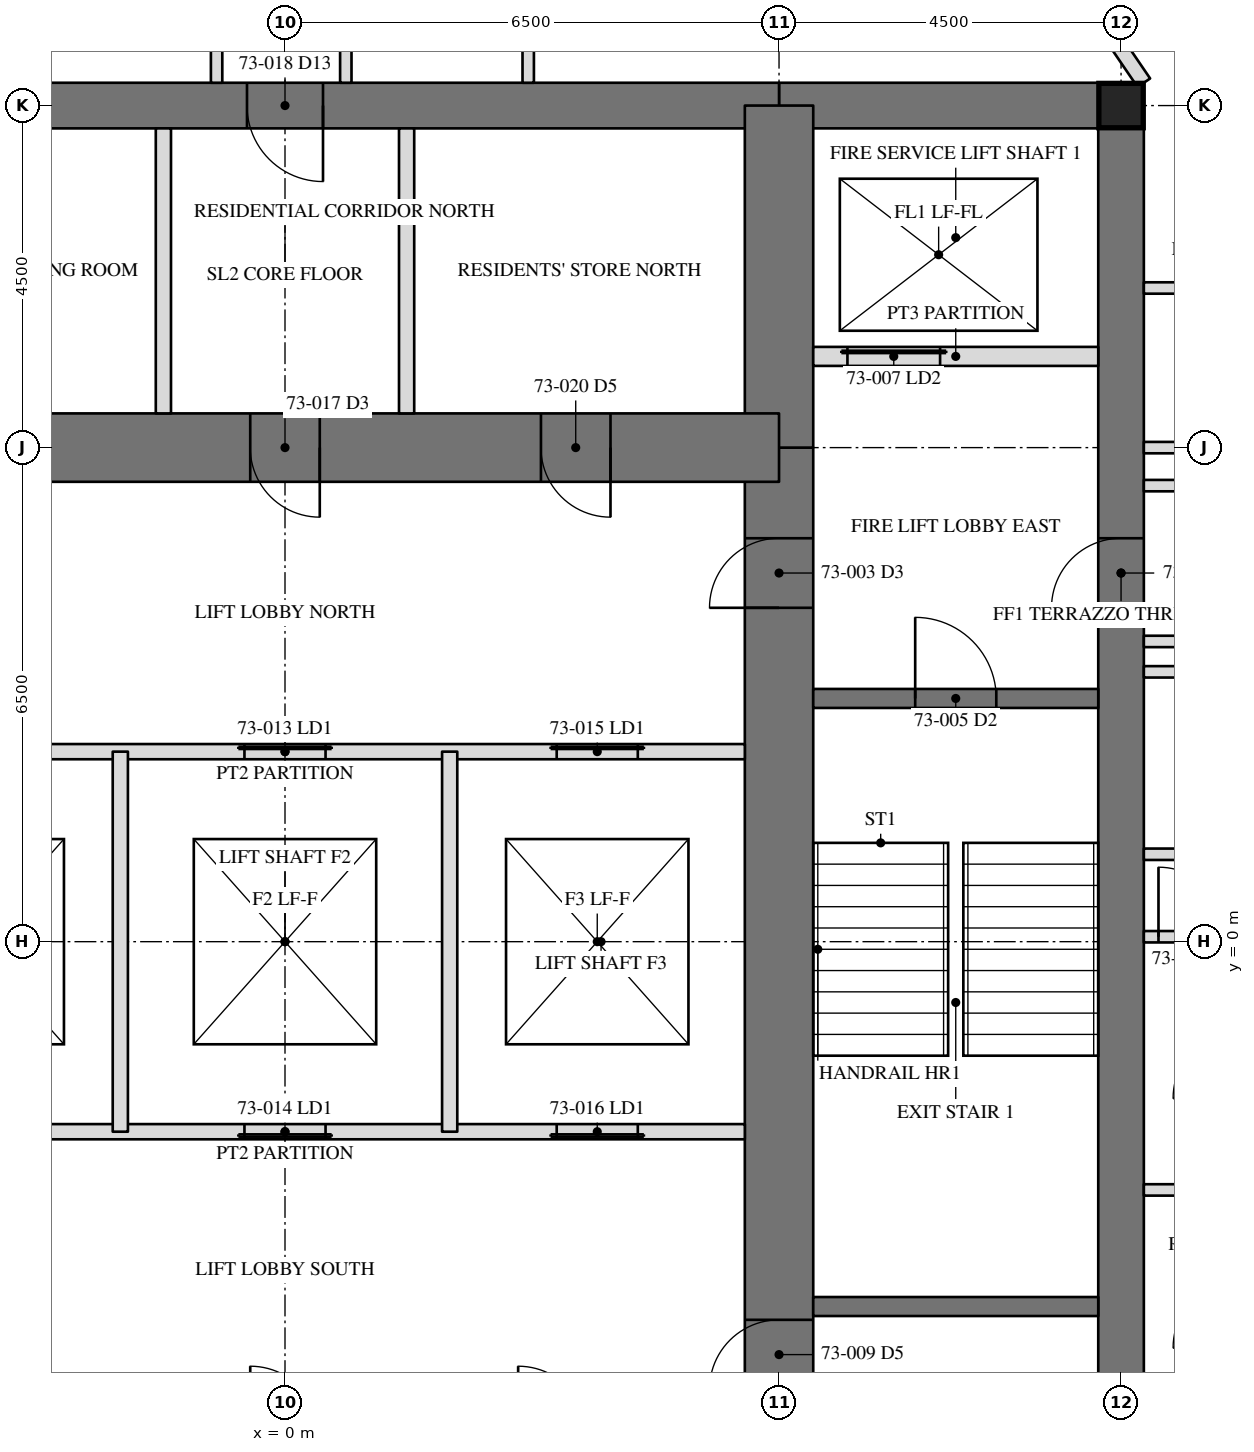
"""IFC4 building model, lengths in metres.
Left out: names, types, materials, properties, quantities, classifications, styles, units other than length and angle.
Written with IfcOpenShell. Run it as: python <this file> out.ifc"""

import sys

from ifc_helpers import new_model, si_unit, direction, frame, frame_2d, origin, origin_2d, place, context, subcontext, project, spatial, rectangle, hollow_rectangle, extrude, element, fill, save


model = new_model("IFC4")
c1 = context("Model", 3, precision=1e-05, world=origin(), true_north=direction((0.0, 1.0)))
c2 = subcontext(c1, "Body", "Model", "MODEL_VIEW")
j1 = project(units=[si_unit("LENGTHUNIT", "METRE"), si_unit("PLANEANGLEUNIT", "RADIAN")], contexts=[c1])
p1 = place(None, origin())
s1 = spatial("IfcSite", under=j1, at=p1, CompositionType="ELEMENT")
p2 = place(p1, origin())
s2 = spatial("IfcBuilding", under=s1, at=p2, CompositionType="ELEMENT")
p3 = place(p2, frame((0.0, 0.0, 295.6)))
s3 = spatial("IfcBuildingStorey", under=s2, at=p3, CompositionType="ELEMENT", Elevation=295.6)
p4 = place(p3, frame((11.0, -11.0, 0.0), z_axis=(0.0, 0.0, 1.0), x_axis=(0.0, 1.0, 0.0)))
e1 = element("IfcWall", 1, at=p4, inside=s3, PredefinedType="SHEAR", context=c2, shape_type="SweptSolid", body=[
    extrude(rectangle(XDim=22.0, YDim=0.6, at=frame_2d((11.0, 0.0))), origin(), (0.0, 0.0, 1.0), 3.6),
])
p5 = place(p4, frame((15.393, 0.0, 0.0)))
e2 = element("IfcOpeningElement", 2, at=p5, cuts=e1, PredefinedType="OPENING", context=c2, shape_type="SweptSolid", body=[
    extrude(rectangle(XDim=0.915, YDim=2.134, at=frame_2d((0.458, 1.067))), frame((0.0, 0.31, 0.0), z_axis=(0.0, -1.0, 0.0), x_axis=(1.0, 0.0, 0.0)), (0.0, 0.0, 1.0), 0.62),
])
p6 = place(p3, frame((11.0, 11.0, 0.0), z_axis=(0.0, 0.0, 1.0), x_axis=(-1.0, 0.0, 0.0)))
e3 = element("IfcWall", 3, at=p6, inside=s3, PredefinedType="SHEAR", context=c2, shape_type="SweptSolid", body=[
    extrude(rectangle(XDim=4.5, YDim=0.6, at=frame_2d((2.25, 0.0))), origin(), (0.0, 0.0, 1.0), 3.6),
])
p7 = place(p3, frame((6.5, 11.0, 0.0), z_axis=(0.0, 0.0, 1.0), x_axis=(-1.0, 0.0, 0.0)))
e4 = element("IfcWall", 4, at=p7, inside=s3, PredefinedType="SHEAR", context=c2, shape_type="SweptSolid", body=[
    extrude(rectangle(XDim=13.0, YDim=0.6, at=frame_2d((6.5, 0.0))), origin(), (0.0, 0.0, 1.0), 3.6),
])
p8 = place(p7, frame((6.0, 0.0, 0.0)))
e5 = element("IfcOpeningElement", 5, at=p8, cuts=e4, PredefinedType="OPENING", context=c2, shape_type="SweptSolid", body=[
    extrude(rectangle(XDim=1.0, YDim=2.134, at=frame_2d((0.5, 1.067))), frame((0.0, 0.31, 0.0), z_axis=(0.0, -1.0, 0.0), x_axis=(1.0, 0.0, 0.0)), (0.0, 0.0, 1.0), 0.62),
])
p9 = place(p3, frame((6.5, -6.5, 0.0), z_axis=(0.0, 0.0, 1.0), x_axis=(0.0, 1.0, 0.0)))
e6 = element("IfcWall", 6, at=p9, inside=s3, PredefinedType="SHEAR", context=c2, shape_type="SweptSolid", body=[
    extrude(rectangle(XDim=13.0, YDim=0.9, at=frame_2d((6.5, 0.0))), origin(), (0.0, 0.0, 1.0), 3.6),
])
p10 = place(p9, frame((10.893, 0.0, 0.0)))
e7 = element("IfcOpeningElement", 7, at=p10, cuts=e6, PredefinedType="OPENING", context=c2, shape_type="SweptSolid", body=[
    extrude(rectangle(XDim=0.915, YDim=2.134, at=frame_2d((0.458, 1.067))), frame((0.0, 0.46, 0.0), z_axis=(0.0, -1.0, 0.0), x_axis=(1.0, 0.0, 0.0)), (0.0, 0.0, 1.0), 0.92),
])
p11 = place(p9, frame((0.61, 0.0, 0.0)))
e8 = element("IfcOpeningElement", 8, at=p11, cuts=e6, PredefinedType="OPENING", context=c2, shape_type="SweptSolid", body=[
    extrude(rectangle(XDim=0.915, YDim=2.134, at=frame_2d((0.458, 1.067))), frame((0.0, 0.46, 0.0), z_axis=(0.0, -1.0, 0.0), x_axis=(1.0, 0.0, 0.0)), (0.0, 0.0, 1.0), 0.92),
])
p12 = place(p3, frame((6.5, 6.5, 0.0), z_axis=(0.0, 0.0, 1.0), x_axis=(0.0, 1.0, 0.0)))
e9 = element("IfcWall", 9, at=p12, inside=s3, PredefinedType="SHEAR", context=c2, shape_type="SweptSolid", body=[
    extrude(rectangle(XDim=4.5, YDim=0.9, at=frame_2d((2.25, 0.0))), origin(), (0.0, 0.0, 1.0), 3.6),
])
p13 = place(p3, frame((6.5, 6.5, 0.0), z_axis=(0.0, 0.0, 1.0), x_axis=(-1.0, 0.0, 0.0)))
e10 = element("IfcWall", 10, at=p13, inside=s3, PredefinedType="SHEAR", context=c2, shape_type="SweptSolid", body=[
    extrude(rectangle(XDim=13.0, YDim=0.9, at=frame_2d((6.5, 0.0))), origin(), (0.0, 0.0, 1.0), 3.6),
])
p14 = place(p13, frame((6.042, 0.0, 0.0)))
e11 = element("IfcOpeningElement", 11, at=p14, cuts=e10, PredefinedType="OPENING", context=c2, shape_type="SweptSolid", body=[
    extrude(rectangle(XDim=0.915, YDim=2.134, at=frame_2d((0.458, 1.067))), frame((0.0, 0.46, 0.0), z_axis=(0.0, -1.0, 0.0), x_axis=(1.0, 0.0, 0.0)), (0.0, 0.0, 1.0), 0.92),
])
p15 = place(p13, frame((9.766, 0.0, 0.0)))
e12 = element("IfcOpeningElement", 12, at=p15, cuts=e10, PredefinedType="OPENING", context=c2, shape_type="SweptSolid", body=[
    extrude(rectangle(XDim=1.118, YDim=2.134, at=frame_2d((0.559, 1.067))), frame((0.0, 0.46, 0.0), z_axis=(0.0, -1.0, 0.0), x_axis=(1.0, 0.0, 0.0)), (0.0, 0.0, 1.0), 0.92),
])
p16 = place(p13, frame((2.218, 0.0, 0.0)))
e13 = element("IfcOpeningElement", 13, at=p16, cuts=e10, PredefinedType="OPENING", context=c2, shape_type="SweptSolid", body=[
    extrude(rectangle(XDim=0.915, YDim=2.134, at=frame_2d((0.458, 1.067))), frame((0.0, 0.46, 0.0), z_axis=(0.0, -1.0, 0.0), x_axis=(1.0, 0.0, 0.0)), (0.0, 0.0, 1.0), 0.92),
])
p17 = place(p3, frame((11.0, 11.0, 0.0), z_axis=(0.0, 0.0, 1.0), x_axis=(1.0, 0.0, 0.0)))
e14 = element("IfcColumn", 14, at=p17, inside=s3, PredefinedType="COLUMN", context=c2, shape_type="SweptSolid", body=[
    extrude(hollow_rectangle(XDim=0.584, YDim=0.584, WallThickness=0.051, at=origin_2d()), origin(), (0.0, 0.0, 1.0), 3.6),
])
p18 = place(p3, frame((6.95, -4.8, 0.0), z_axis=(0.0, 0.0, 1.0), x_axis=(1.0, 0.0, 0.0)))
e15 = element("IfcWall", 15, at=p18, inside=s3, PredefinedType="SOLIDWALL", context=c2, shape_type="SweptSolid", body=[
    extrude(rectangle(XDim=3.75, YDim=0.25, at=frame_2d((1.875, 0.0))), origin(), (0.0, 0.0, 1.0), 3.41),
])
p19 = place(p3, frame((6.95, 3.2, 0.0), z_axis=(0.0, 0.0, 1.0), x_axis=(1.0, 0.0, 0.0)))
e16 = element("IfcWall", 16, at=p19, inside=s3, PredefinedType="SOLIDWALL", context=c2, shape_type="SweptSolid", body=[
    extrude(rectangle(XDim=3.75, YDim=0.25, at=frame_2d((1.875, 0.0))), origin(), (0.0, 0.0, 1.0), 3.41),
])
p20 = place(p19, frame((1.342, 0.0, 0.0)))
e17 = element("IfcOpeningElement", 17, at=p20, cuts=e16, PredefinedType="OPENING", context=c2, shape_type="SweptSolid", body=[
    extrude(rectangle(XDim=1.067, YDim=2.134, at=frame_2d((0.533, 1.067))), frame((0.0, 0.135, 0.0), z_axis=(0.0, -1.0, 0.0), x_axis=(1.0, 0.0, 0.0)), (0.0, 0.0, 1.0), 0.27),
])
p21 = place(p3, frame((6.95, 7.7, 0.0), z_axis=(0.0, 0.0, 1.0), x_axis=(1.0, 0.0, 0.0)))
e18 = element("IfcWall", 18, at=p21, inside=s3, PredefinedType="PARTITIONING", context=c2, shape_type="SweptSolid", body=[
    extrude(rectangle(XDim=3.75, YDim=0.25, at=frame_2d((1.875, 0.0))), origin(), (0.0, 0.0, 1.0), 3.41),
])
p22 = place(p21, frame((0.45, 0.0, 0.0)))
e19 = element("IfcOpeningElement", 19, at=p22, cuts=e18, PredefinedType="OPENING", context=c2, shape_type="SweptSolid", body=[
    extrude(rectangle(XDim=1.219, YDim=2.134, at=frame_2d((0.609, 1.067))), frame((0.0, 0.135, 0.0), z_axis=(0.0, -1.0, 0.0), x_axis=(1.0, 0.0, 0.0)), (0.0, 0.0, 1.0), 0.27),
])
p23 = place(p3, frame((-6.05, 2.5, 0.0), z_axis=(0.0, 0.0, 1.0), x_axis=(1.0, 0.0, 0.0)))
e20 = element("IfcWall", 20, at=p23, inside=s3, PredefinedType="PARTITIONING", context=c2, shape_type="SweptSolid", body=[
    extrude(rectangle(XDim=12.1, YDim=0.2, at=frame_2d((6.05, 0.0))), origin(), (0.0, 0.0, 1.0), 3.41),
])
p24 = place(p23, frame((1.408, 0.0, 0.0)))
e21 = element("IfcOpeningElement", 21, at=p24, cuts=e20, PredefinedType="OPENING", context=c2, shape_type="SweptSolid", body=[
    extrude(rectangle(XDim=1.067, YDim=2.134, at=frame_2d((0.533, 1.067))), frame((0.0, 0.11, 0.0), z_axis=(0.0, -1.0, 0.0), x_axis=(1.0, 0.0, 0.0)), (0.0, 0.0, 1.0), 0.22),
])
p25 = place(p23, frame((5.517, 0.0, 0.0)))
e22 = element("IfcOpeningElement", 22, at=p25, cuts=e20, PredefinedType="OPENING", context=c2, shape_type="SweptSolid", body=[
    extrude(rectangle(XDim=1.067, YDim=2.134, at=frame_2d((0.533, 1.067))), frame((0.0, 0.11, 0.0), z_axis=(0.0, -1.0, 0.0), x_axis=(1.0, 0.0, 0.0)), (0.0, 0.0, 1.0), 0.22),
])
p26 = place(p23, frame((9.625, 0.0, 0.0)))
e23 = element("IfcOpeningElement", 23, at=p26, cuts=e20, PredefinedType="OPENING", context=c2, shape_type="SweptSolid", body=[
    extrude(rectangle(XDim=1.067, YDim=2.134, at=frame_2d((0.533, 1.067))), frame((0.0, 0.11, 0.0), z_axis=(0.0, -1.0, 0.0), x_axis=(1.0, 0.0, 0.0)), (0.0, 0.0, 1.0), 0.22),
])
p27 = place(p3, frame((6.05, -2.5, 0.0), z_axis=(0.0, 0.0, 1.0), x_axis=(-1.0, 0.0, 0.0)))
e24 = element("IfcWall", 24, at=p27, inside=s3, PredefinedType="PARTITIONING", context=c2, shape_type="SweptSolid", body=[
    extrude(rectangle(XDim=12.1, YDim=0.2, at=frame_2d((6.05, 0.0))), origin(), (0.0, 0.0, 1.0), 3.41),
])
p28 = place(p27, frame((9.625, 0.0, 0.0)))
e25 = element("IfcOpeningElement", 25, at=p28, cuts=e24, PredefinedType="OPENING", context=c2, shape_type="SweptSolid", body=[
    extrude(rectangle(XDim=1.067, YDim=2.134, at=frame_2d((0.533, 1.067))), frame((0.0, 0.11, 0.0), z_axis=(0.0, -1.0, 0.0), x_axis=(1.0, 0.0, 0.0)), (0.0, 0.0, 1.0), 0.22),
])
p29 = place(p27, frame((5.517, 0.0, 0.0)))
e26 = element("IfcOpeningElement", 26, at=p29, cuts=e24, PredefinedType="OPENING", context=c2, shape_type="SweptSolid", body=[
    extrude(rectangle(XDim=1.067, YDim=2.134, at=frame_2d((0.533, 1.067))), frame((0.0, 0.11, 0.0), z_axis=(0.0, -1.0, 0.0), x_axis=(1.0, 0.0, 0.0)), (0.0, 0.0, 1.0), 0.22),
])
p30 = place(p27, frame((1.408, 0.0, 0.0)))
e27 = element("IfcOpeningElement", 27, at=p30, cuts=e24, PredefinedType="OPENING", context=c2, shape_type="SweptSolid", body=[
    extrude(rectangle(XDim=1.067, YDim=2.134, at=frame_2d((0.533, 1.067))), frame((0.0, 0.11, 0.0), z_axis=(0.0, -1.0, 0.0), x_axis=(1.0, 0.0, 0.0)), (0.0, 0.0, 1.0), 0.22),
])
for number, where, z_axis, x_axis in (
    (28, (-2.167, -2.5, 0.0), (0.0, 0.0, 1.0), (0.0, 1.0, 0.0)),
    (29, (2.167, -2.5, 0.0), (0.0, 0.0, 1.0), (0.0, 1.0, 0.0)),
):
    element("IfcWall", number, at=place(p3, frame(where, z_axis=z_axis, x_axis=x_axis)), inside=s3, PredefinedType="PARTITIONING", context=c2, shape_type="SweptSolid", body=[
        extrude(rectangle(XDim=5.0, YDim=0.2, at=frame_2d((2.5, 0.0))), origin(), (0.0, 0.0, 1.0), 3.41),
    ])
for number, where, z_axis, x_axis in (
    (30, (-1.6, 6.95, 0.0), (0.0, 0.0, 1.0), (0.0, 1.0, 0.0)),
    (31, (1.6, 6.95, 0.0), (0.0, 0.0, 1.0), (0.0, 1.0, 0.0)),
):
    element("IfcWall", number, at=place(p3, frame(where, z_axis=z_axis, x_axis=x_axis)), inside=s3, PredefinedType="PARTITIONING", context=c2, shape_type="SweptSolid", body=[
        extrude(rectangle(XDim=3.75, YDim=0.2, at=frame_2d((1.875, 0.0))), origin(), (0.0, 0.0, 1.0), 3.41),
    ])
p31 = place(p3, frame((11.3, 11.3, 0.0), z_axis=(0.0, 0.0, 1.0), x_axis=(-0.563469639691, 0.826136771453, 0.0)))
e32 = element("IfcWall", 32, at=p31, inside=s3, PredefinedType="PARTITIONING", context=c2, shape_type="SweptSolid", body=[
    extrude(rectangle(XDim=3.137, YDim=0.2, at=frame_2d((1.568, 0.0))), origin(), (0.0, 0.0, 1.0), 2.704),
])
p32 = place(p3, frame((11.3, -3.266, 0.0), z_axis=(0.0, 0.0, 1.0), x_axis=(1.0, 0.0, 0.0)))
e33 = element("IfcWall", 33, at=p32, inside=s3, PredefinedType="PARTITIONING", context=c2, shape_type="SweptSolid", body=[
    extrude(rectangle(XDim=5.615, YDim=0.15, at=frame_2d((2.808, 0.0))), origin(), (0.0, 0.0, 1.0), 2.709),
])
p33 = place(p3, frame((11.3, 0.065, 0.0), z_axis=(0.0, 0.0, 1.0), x_axis=(1.0, 0.0, 0.0)))
e34 = element("IfcWall", 34, at=p33, inside=s3, PredefinedType="PARTITIONING", context=c2, shape_type="SweptSolid", body=[
    extrude(rectangle(XDim=5.615, YDim=0.15, at=frame_2d((2.808, 0.0))), origin(), (0.0, 0.0, 1.0), 2.709),
])
p34 = place(p33, frame((0.192, 0.0, 0.0)))
e35 = element("IfcOpeningElement", 35, at=p34, cuts=e34, PredefinedType="OPENING", context=c2, shape_type="SweptSolid", body=[
    extrude(rectangle(XDim=0.915, YDim=2.134, at=frame_2d((0.458, 1.067))), frame((0.0, 0.085, 0.0), z_axis=(0.0, -1.0, 0.0), x_axis=(1.0, 0.0, 0.0)), (0.0, 0.0, 1.0), 0.17),
])
p35 = place(p3, frame((11.3, 6.5, 0.0), z_axis=(0.0, 0.0, 1.0), x_axis=(1.0, 0.0, 0.0)))
e36 = element("IfcWall", 36, at=p35, inside=s3, PredefinedType="PARTITIONING", context=c2, shape_type="SweptSolid", body=[
    extrude(rectangle(XDim=5.615, YDim=0.15, at=frame_2d((2.808, 0.0))), origin(), (0.0, 0.0, 1.0), 2.966),
])
p36 = place(p35, frame((2.742, 0.0, 0.0)))
e37 = element("IfcOpeningElement", 37, at=p36, cuts=e36, PredefinedType="OPENING", context=c2, shape_type="SweptSolid", body=[
    extrude(rectangle(XDim=0.915, YDim=2.134, at=frame_2d((0.458, 1.067))), frame((0.0, 0.085, 0.0), z_axis=(0.0, -1.0, 0.0), x_axis=(1.0, 0.0, 0.0)), (0.0, 0.0, 1.0), 0.17),
])
for number, where, z_axis, x_axis in (
    (38, (11.3, 3.95, 0.0), (0.0, 0.0, 1.0), (1.0, 0.0, 0.0)),
    (39, (11.3, 6.0, 0.0), (0.0, 0.0, 1.0), (1.0, 0.0, 0.0)),
):
    element("IfcWall", number, at=place(p3, frame(where, z_axis=z_axis, x_axis=x_axis)), inside=s3, PredefinedType="PARTITIONING", context=c2, shape_type="SweptSolid", body=[
        extrude(rectangle(XDim=1.525, YDim=0.15, at=frame_2d((0.762, 0.0))), origin(), (0.0, 0.0, 1.0), 3.41),
    ])
for number, where, z_axis, x_axis in (
    (40, (11.3, 1.15, 0.0), (0.0, 0.0, 1.0), (1.0, 0.0, 0.0)),
    (41, (11.3, 3.55, 0.0), (0.0, 0.0, 1.0), (1.0, 0.0, 0.0)),
):
    element("IfcWall", number, at=place(p3, frame(where, z_axis=z_axis, x_axis=x_axis)), inside=s3, PredefinedType="PARTITIONING", context=c2, shape_type="SweptSolid", body=[
        extrude(rectangle(XDim=2.725, YDim=0.15, at=frame_2d((1.362, 0.0))), origin(), (0.0, 0.0, 1.0), 3.41),
    ])
p37 = place(p3, frame((11.3, 8.6, 0.0), z_axis=(0.0, 0.0, 1.0), x_axis=(1.0, 0.0, 0.0)))
e42 = element("IfcWall", 42, at=p37, inside=s3, PredefinedType="PARTITIONING", context=c2, shape_type="SweptSolid", body=[
    extrude(rectangle(XDim=1.925, YDim=0.15, at=frame_2d((0.962, 0.0))), origin(), (0.0, 0.0, 1.0), 3.41),
])
p38 = place(p3, frame((-0.9, 11.3, 0.0), z_axis=(0.0, 0.0, 1.0), x_axis=(0.0, 1.0, 0.0)))
e43 = element("IfcWall", 43, at=p38, inside=s3, PredefinedType="PARTITIONING", context=c2, shape_type="SweptSolid", body=[
    extrude(rectangle(XDim=2.725, YDim=0.15, at=frame_2d((1.362, 0.0))), origin(), (0.0, 0.0, 1.0), 3.41),
])
p39 = place(p3, frame((3.2, 11.3, 0.0), z_axis=(0.0, 0.0, 1.0), x_axis=(0.0, 1.0, 0.0)))
e44 = element("IfcWall", 44, at=p39, inside=s3, PredefinedType="PARTITIONING", context=c2, shape_type="SweptSolid", body=[
    extrude(rectangle(XDim=2.375, YDim=0.15, at=frame_2d((1.188, 0.0))), origin(), (0.0, 0.0, 1.0), 2.709),
])
p40 = place(p3, frame((0.8, 11.3, 0.0), z_axis=(0.0, 0.0, 1.0), x_axis=(0.0, 1.0, 0.0)))
e45 = element("IfcWall", 45, at=p40, inside=s3, PredefinedType="PARTITIONING", context=c2, shape_type="SweptSolid", body=[
    extrude(rectangle(XDim=2.375, YDim=0.15, at=frame_2d((1.188, 0.0))), origin(), (0.0, 0.0, 1.0), 3.41),
])
p41 = place(p5, origin())
e46 = element("IfcDoor", 46, at=p41, inside=s3, OperationType="SINGLE_SWING_RIGHT", PredefinedType="DOOR", context=c2, shape_type="SweptSolid", body=[
    extrude(rectangle(XDim=0.915, YDim=2.134, at=frame_2d((0.458, 1.067))), frame((0.0, -0.225, 0.0), z_axis=(0.0, -1.0, 0.0), x_axis=(1.0, 0.0, 0.0)), (0.0, 0.0, 1.0), 0.05),
])
fill(e2, e46)
p42 = place(p10, origin())
e47 = element("IfcDoor", 47, at=p42, inside=s3, OperationType="SINGLE_SWING_RIGHT", PredefinedType="DOOR", context=c2, shape_type="SweptSolid", body=[
    extrude(rectangle(XDim=0.915, YDim=2.134, at=frame_2d((0.458, 1.067))), frame((0.0, -0.375, 0.0), z_axis=(0.0, -1.0, 0.0), x_axis=(1.0, 0.0, 0.0)), (0.0, 0.0, 1.0), 0.05),
])
fill(e7, e47)
p43 = place(p20, origin())
e48 = element("IfcDoor", 48, at=p43, inside=s3, OperationType="SINGLE_SWING_LEFT", PredefinedType="DOOR", context=c2, shape_type="SweptSolid", body=[
    extrude(rectangle(XDim=1.067, YDim=2.134, at=frame_2d((0.533, 1.067))), frame((0.0, 0.025, 0.0), z_axis=(0.0, -1.0, 0.0), x_axis=(1.0, 0.0, 0.0)), (0.0, 0.0, 1.0), 0.05),
])
fill(e17, e48)
p44 = place(p22, origin())
e49 = element("IfcDoor", 49, at=p44, inside=s3, OperationType="SLIDING_TO_LEFT", PredefinedType="DOOR", context=c2, shape_type="SweptSolid", body=[
    extrude(rectangle(XDim=1.219, YDim=2.134, at=frame_2d((0.609, 1.067))), frame((0.0, 0.025, 0.0), z_axis=(0.0, -1.0, 0.0), x_axis=(1.0, 0.0, 0.0)), (0.0, 0.0, 1.0), 0.05),
])
fill(e19, e49)
p45 = place(p11, origin())
e50 = element("IfcDoor", 50, at=p45, inside=s3, OperationType="SINGLE_SWING_RIGHT", PredefinedType="DOOR", context=c2, shape_type="SweptSolid", body=[
    extrude(rectangle(XDim=0.915, YDim=2.134, at=frame_2d((0.458, 1.067))), frame((0.0, -0.375, 0.0), z_axis=(0.0, -1.0, 0.0), x_axis=(1.0, 0.0, 0.0)), (0.0, 0.0, 1.0), 0.05),
])
fill(e8, e50)
p46 = place(p25, origin())
e51 = element("IfcDoor", 51, at=p46, inside=s3, OperationType="SLIDING_TO_LEFT", PredefinedType="DOOR", context=c2, shape_type="SweptSolid", body=[
    extrude(rectangle(XDim=1.067, YDim=2.134, at=frame_2d((0.533, 1.067))), frame((0.0, 0.025, 0.0), z_axis=(0.0, -1.0, 0.0), x_axis=(1.0, 0.0, 0.0)), (0.0, 0.0, 1.0), 0.05),
])
fill(e22, e51)
p47 = place(p29, origin())
e52 = element("IfcDoor", 52, at=p47, inside=s3, OperationType="SLIDING_TO_LEFT", PredefinedType="DOOR", context=c2, shape_type="SweptSolid", body=[
    extrude(rectangle(XDim=1.067, YDim=2.134, at=frame_2d((0.533, 1.067))), frame((0.0, 0.025, 0.0), z_axis=(0.0, -1.0, 0.0), x_axis=(1.0, 0.0, 0.0)), (0.0, 0.0, 1.0), 0.05),
])
fill(e26, e52)
p48 = place(p26, origin())
e53 = element("IfcDoor", 53, at=p48, inside=s3, OperationType="SLIDING_TO_LEFT", PredefinedType="DOOR", context=c2, shape_type="SweptSolid", body=[
    extrude(rectangle(XDim=1.067, YDim=2.134, at=frame_2d((0.533, 1.067))), frame((0.0, 0.025, 0.0), z_axis=(0.0, -1.0, 0.0), x_axis=(1.0, 0.0, 0.0)), (0.0, 0.0, 1.0), 0.05),
])
fill(e23, e53)
p49 = place(p30, origin())
e54 = element("IfcDoor", 54, at=p49, inside=s3, OperationType="SLIDING_TO_LEFT", PredefinedType="DOOR", context=c2, shape_type="SweptSolid", body=[
    extrude(rectangle(XDim=1.067, YDim=2.134, at=frame_2d((0.533, 1.067))), frame((0.0, 0.025, 0.0), z_axis=(0.0, -1.0, 0.0), x_axis=(1.0, 0.0, 0.0)), (0.0, 0.0, 1.0), 0.05),
])
fill(e27, e54)
p50 = place(p14, origin())
e55 = element("IfcDoor", 55, at=p50, inside=s3, OperationType="SINGLE_SWING_RIGHT", PredefinedType="DOOR", context=c2, shape_type="SweptSolid", body=[
    extrude(rectangle(XDim=0.915, YDim=2.134, at=frame_2d((0.458, 1.067))), frame((0.0, -0.375, 0.0), z_axis=(0.0, -1.0, 0.0), x_axis=(1.0, 0.0, 0.0)), (0.0, 0.0, 1.0), 0.05),
])
fill(e11, e55)
p51 = place(p8, origin())
e56 = element("IfcDoor", 56, at=p51, inside=s3, OperationType="SINGLE_SWING_RIGHT", PredefinedType="DOOR", context=c2, shape_type="SweptSolid", body=[
    extrude(rectangle(XDim=1.0, YDim=2.134, at=frame_2d((0.5, 1.067))), frame((0.0, -0.225, 0.0), z_axis=(0.0, -1.0, 0.0), x_axis=(1.0, 0.0, 0.0)), (0.0, 0.0, 1.0), 0.05),
])
fill(e5, e56)
p52 = place(p16, origin())
e57 = element("IfcDoor", 57, at=p52, inside=s3, OperationType="SINGLE_SWING_RIGHT", PredefinedType="DOOR", context=c2, shape_type="SweptSolid", body=[
    extrude(rectangle(XDim=0.915, YDim=2.134, at=frame_2d((0.458, 1.067))), frame((0.0, -0.375, 0.0), z_axis=(0.0, -1.0, 0.0), x_axis=(1.0, 0.0, 0.0)), (0.0, 0.0, 1.0), 0.05),
])
fill(e13, e57)
p53 = place(p34, origin())
e58 = element("IfcDoor", 58, at=p53, inside=s3, OperationType="SINGLE_SWING_LEFT", PredefinedType="DOOR", context=c2, shape_type="SweptSolid", body=[
    extrude(rectangle(XDim=0.915, YDim=2.134, at=frame_2d((0.458, 1.067))), frame((0.0, 0.025, 0.0), z_axis=(0.0, -1.0, 0.0), x_axis=(1.0, 0.0, 0.0)), (0.0, 0.0, 1.0), 0.05),
])
fill(e35, e58)
save(model, sys.argv[1])
